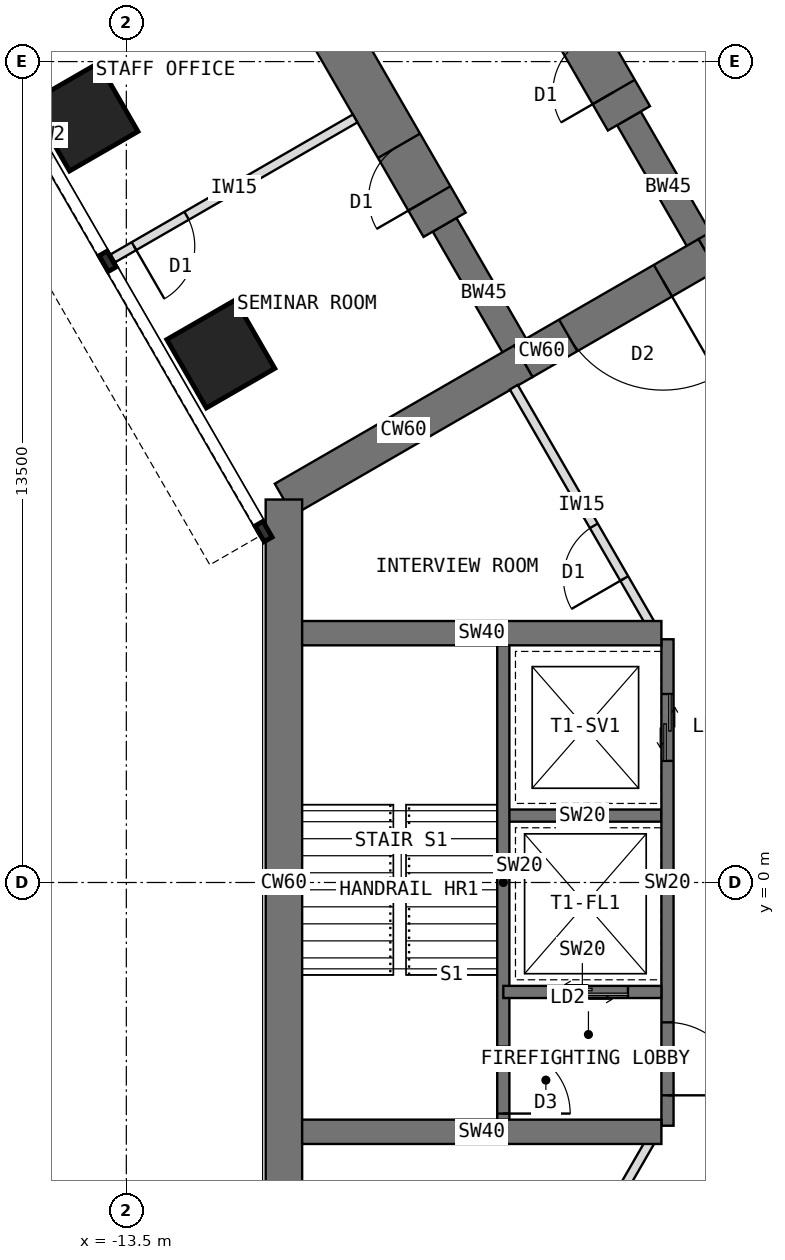
"""IFC4 building model, lengths in metres.
Left out: names, types, materials, properties, quantities, classifications, styles, units other than length and angle.
Written with IfcOpenShell. Run it as: python <this file> out.ifc"""

import sys

from ifc_helpers import new_model, si_unit, direction, frame, frame_2d, origin, origin_2d, place, context, subcontext, project, spatial, rectangle, extrude, element, fill, save


model = new_model("IFC4")
c1 = context("Model", 3, precision=1e-05, world=origin(), true_north=direction((0.0, 1.0)))
c2 = subcontext(c1, "Body", "Model", "MODEL_VIEW")
j1 = project(units=[si_unit("LENGTHUNIT", "METRE"), si_unit("PLANEANGLEUNIT", "RADIAN")], contexts=[c1])
p1 = place(None, origin())
s1 = spatial("IfcSite", under=j1, at=p1, CompositionType="ELEMENT")
p2 = place(p1, origin())
s2 = spatial("IfcBuilding", under=s1, at=p2, CompositionType="ELEMENT")
p3 = place(p2, frame((0.0, 0.0, 133.5)))
s3 = spatial("IfcBuildingStorey", under=s2, at=p3, CompositionType="ELEMENT", Elevation=133.5)
p4 = place(p3, frame((0.0, 12.596, 0.0), z_axis=(0.0, 0.0, 1.0), x_axis=(-0.866011268655, -0.500024481964, 0.0)))
e1 = element("IfcWall", 1, at=p4, inside=s3, PredefinedType="SHEAR", context=c2, shape_type="SweptSolid", body=[
    extrude(rectangle(XDim=4.548, YDim=0.6, at=frame_2d((2.274, 0.0))), origin(), (0.0, 0.0, 1.0), 4.0),
])
p5 = place(p3, frame((-3.939, 10.322, 0.0), z_axis=(0.0, 0.0, 1.0), x_axis=(-0.866019471182, -0.500010275428, 0.0)))
e2 = element("IfcWall", 2, at=p5, inside=s3, PredefinedType="SHEAR", context=c2, shape_type="SweptSolid", body=[
    extrude(rectangle(XDim=3.5, YDim=0.6, at=frame_2d((1.75, 0.0))), origin(), (0.0, 0.0, 1.0), 4.0),
])
p6 = place(p5, frame((0.85, 0.0, 0.0)))
e3 = element("IfcOpeningElement", 3, at=p6, cuts=e2, PredefinedType="OPENING", context=c2, shape_type="SweptSolid", body=[
    extrude(rectangle(XDim=1.8, YDim=2.1, at=frame_2d((0.9, 1.05))), frame((0.0, 0.31, 0.0), z_axis=(0.0, -1.0, 0.0), x_axis=(1.0, 0.0, 0.0)), (0.0, 0.0, 1.0), 0.62),
])
p7 = place(p3, frame((-6.97, 8.572, 0.0), z_axis=(0.0, 0.0, 1.0), x_axis=(-0.866034513004, -0.499984222037, 0.0)))
e4 = element("IfcWall", 4, at=p7, inside=s3, PredefinedType="SHEAR", context=c2, shape_type="SweptSolid", body=[
    extrude(rectangle(XDim=4.548, YDim=0.6, at=frame_2d((2.274, 0.0))), origin(), (0.0, 0.0, 1.0), 4.0),
])
p8 = place(p3, frame((-10.908, 6.298, 0.0), z_axis=(0.0, 0.0, 1.0), x_axis=(0.0, -1.0, 0.0)))
e5 = element("IfcWall", 5, at=p8, inside=s3, PredefinedType="SHEAR", context=c2, shape_type="SweptSolid", body=[
    extrude(rectangle(XDim=12.596, YDim=0.6, at=frame_2d((6.298, 0.0))), origin(), (0.0, 0.0, 1.0), 4.0),
])
p9 = place(p3, frame((-6.97, 8.572, 0.0), z_axis=(0.0, 0.0, 1.0), x_axis=(-0.499988811324, 0.866031863473, 0.0)))
e6 = element("IfcWall", 6, at=p9, inside=s3, PredefinedType="SHEAR", context=c2, shape_type="SweptSolid", body=[
    extrude(rectangle(XDim=2.592, YDim=0.45, at=frame_2d((1.296, 0.0))), origin(), (0.0, 0.0, 1.0), 4.0),
])
p10 = place(p3, frame((-8.266, 10.816, 0.0), z_axis=(0.0, 0.0, 1.0), x_axis=(-0.499996231654, 0.866027579429, 0.0)))
e7 = element("IfcWall", 7, at=p10, inside=s3, PredefinedType="SHEAR", context=c2, shape_type="SweptSolid", body=[
    extrude(rectangle(XDim=13.2, YDim=0.8, at=frame_2d((6.6, 0.0))), origin(), (0.0, 0.0, 1.0), 4.0),
])
p11 = place(p10, frame((0.5, 0.0, 0.0)))
e8 = element("IfcOpeningElement", 8, at=p11, cuts=e7, PredefinedType="OPENING", context=c2, shape_type="SweptSolid", body=[
    extrude(rectangle(XDim=1.0, YDim=2.1, at=frame_2d((0.5, 1.05))), frame((0.0, 0.41, 0.0), z_axis=(0.0, -1.0, 0.0), x_axis=(1.0, 0.0, 0.0)), (0.0, 0.0, 1.0), 0.82),
])
p12 = place(p10, frame((7.25, 0.0, 0.0)))
e9 = element("IfcOpeningElement", 9, at=p12, cuts=e7, PredefinedType="OPENING", context=c2, shape_type="SweptSolid", body=[
    extrude(rectangle(XDim=1.0, YDim=2.1, at=frame_2d((0.5, 1.05))), frame((0.0, 0.41, 0.0), z_axis=(0.0, -1.0, 0.0), x_axis=(1.0, 0.0, 0.0)), (0.0, 0.0, 1.0), 0.82),
])
p13 = place(p3, frame((-3.939, 10.322, 0.0), z_axis=(0.0, 0.0, 1.0), x_axis=(-0.499918158782, 0.866072649678, 0.0)))
e10 = element("IfcWall", 10, at=p13, inside=s3, PredefinedType="SHEAR", context=c2, shape_type="SweptSolid", body=[
    extrude(rectangle(XDim=2.592, YDim=0.45, at=frame_2d((1.296, 0.0))), origin(), (0.0, 0.0, 1.0), 4.0),
])
p14 = place(p3, frame((-5.234, 12.566, 0.0), z_axis=(0.0, 0.0, 1.0), x_axis=(-0.500010103361, 0.866019570528, 0.0)))
e11 = element("IfcWall", 11, at=p14, inside=s3, PredefinedType="SHEAR", context=c2, shape_type="SweptSolid", body=[
    extrude(rectangle(XDim=13.2, YDim=0.8, at=frame_2d((6.6, 0.0))), origin(), (0.0, 0.0, 1.0), 4.0),
])
p15 = place(p14, frame((0.5, 0.0, 0.0)))
e12 = element("IfcOpeningElement", 12, at=p15, cuts=e11, PredefinedType="OPENING", context=c2, shape_type="SweptSolid", body=[
    extrude(rectangle(XDim=1.0, YDim=2.1, at=frame_2d((0.5, 1.05))), frame((0.0, 0.41, 0.0), z_axis=(0.0, -1.0, 0.0), x_axis=(1.0, 0.0, 0.0)), (0.0, 0.0, 1.0), 0.82),
])
p16 = place(p14, frame((7.25, 0.0, 0.0)))
e13 = element("IfcOpeningElement", 13, at=p16, cuts=e11, PredefinedType="OPENING", context=c2, shape_type="SweptSolid", body=[
    extrude(rectangle(XDim=1.0, YDim=2.1, at=frame_2d((0.5, 1.05))), frame((0.0, 0.41, 0.0), z_axis=(0.0, -1.0, 0.0), x_axis=(1.0, 0.0, 0.0)), (0.0, 0.0, 1.0), 0.82),
])
for number, where, z_axis, x_axis in (
    (14, (-11.946, 8.691, 0.0), (0.0, 0.0, 1.0), (0.866, 0.5, 0.0)),
    (15, (-14.196, 12.588, 0.0), (0.0, 0.0, 1.0), (0.866, 0.5, 0.0)),
):
    element("IfcColumn", number, at=place(p3, frame(where, z_axis=z_axis, x_axis=x_axis)), inside=s3, PredefinedType="COLUMN", context=c2, shape_type="SweptSolid", body=[
        extrude(rectangle(XDim=1.3, YDim=1.3, at=origin_2d()), origin(), (0.0, 0.0, 1.0), 4.0),
    ])
p17 = place(p3, frame((-4.6, 4.0, 0.0), z_axis=(0.0, 0.0, 1.0), x_axis=(0.0, -1.0, 0.0)))
e16 = element("IfcWall", 16, at=p17, inside=s3, PredefinedType="SHEAR", context=c2, shape_type="SweptSolid", body=[
    extrude(rectangle(XDim=8.0, YDim=0.2, at=frame_2d((4.0, 0.0))), origin(), (0.0, 0.0, 1.0), 4.0),
])
p18 = place(p17, frame((6.3, 0.0, 0.0)))
e17 = element("IfcOpeningElement", 17, at=p18, cuts=e16, PredefinedType="OPENING", context=c2, shape_type="SweptSolid", body=[
    extrude(rectangle(XDim=1.2, YDim=2.1, at=frame_2d((0.6, 1.05))), frame((0.0, 0.11, 0.0), z_axis=(0.0, -1.0, 0.0), x_axis=(1.0, 0.0, 0.0)), (0.0, 0.0, 1.0), 0.22),
])
p19 = place(p17, frame((0.9, 0.0, 0.0)))
e18 = element("IfcOpeningElement", 18, at=p19, cuts=e16, PredefinedType="OPENING", context=c2, shape_type="SweptSolid", body=[
    extrude(rectangle(XDim=1.1, YDim=2.2, at=frame_2d((0.55, 1.1))), frame((0.0, 0.11, 0.0), z_axis=(0.0, -1.0, 0.0), x_axis=(1.0, 0.0, 0.0)), (0.0, 0.0, 1.0), 0.22),
])
p20 = place(p3, frame((-4.7, 1.1, 0.0), z_axis=(0.0, 0.0, 1.0), x_axis=(-1.0, 0.0, 0.0)))
e19 = element("IfcWall", 19, at=p20, inside=s3, PredefinedType="SHEAR", context=c2, shape_type="SweptSolid", body=[
    extrude(rectangle(XDim=2.6, YDim=0.2, at=frame_2d((1.3, 0.0))), origin(), (0.0, 0.0, 1.0), 4.0),
])
p21 = place(p3, frame((-4.7, -1.8, 0.0), z_axis=(0.0, 0.0, 1.0), x_axis=(-1.0, 0.0, 0.0)))
e20 = element("IfcWall", 20, at=p21, inside=s3, PredefinedType="SHEAR", context=c2, shape_type="SweptSolid", body=[
    extrude(rectangle(XDim=2.6, YDim=0.2, at=frame_2d((1.3, 0.0))), origin(), (0.0, 0.0, 1.0), 4.0),
])
p22 = place(p21, frame((0.55, 0.0, 0.0)))
e21 = element("IfcOpeningElement", 21, at=p22, cuts=e20, PredefinedType="OPENING", context=c2, shape_type="SweptSolid", body=[
    extrude(rectangle(XDim=1.3, YDim=2.2, at=frame_2d((0.65, 1.1))), frame((0.0, 0.11, 0.0), z_axis=(0.0, -1.0, 0.0), x_axis=(1.0, 0.0, 0.0)), (0.0, 0.0, 1.0), 0.22),
])
p23 = place(p3, frame((-7.3, 4.0, 0.0), z_axis=(0.0, 0.0, 1.0), x_axis=(0.0, -1.0, 0.0)))
e22 = element("IfcWall", 22, at=p23, inside=s3, PredefinedType="SHEAR", context=c2, shape_type="SweptSolid", body=[
    extrude(rectangle(XDim=8.0, YDim=0.2, at=frame_2d((4.0, 0.0))), origin(), (0.0, 0.0, 1.0), 4.0),
])
p24 = place(p23, frame((6.7, 0.0, 0.0)))
e23 = element("IfcOpeningElement", 23, at=p24, cuts=e22, PredefinedType="OPENING", context=c2, shape_type="SweptSolid", body=[
    extrude(rectangle(XDim=1.1, YDim=2.1, at=frame_2d((0.55, 1.05))), frame((0.0, 0.11, 0.0), z_axis=(0.0, -1.0, 0.0), x_axis=(1.0, 0.0, 0.0)), (0.0, 0.0, 1.0), 0.22),
])
for number, where, z_axis, x_axis in (
    (24, (-4.7, -4.1, 0.0), (0.0, 0.0, 1.0), (-1.0, 0.0, 0.0)),
    (25, (-4.7, 4.1, 0.0), (0.0, 0.0, 1.0), (-1.0, 0.0, 0.0)),
):
    element("IfcWall", number, at=place(p3, frame(where, z_axis=z_axis, x_axis=x_axis)), inside=s3, PredefinedType="SHEAR", context=c2, shape_type="SweptSolid", body=[
        extrude(rectangle(XDim=5.908, YDim=0.4, at=frame_2d((2.954, 0.0))), origin(), (0.0, 0.0, 1.0), 4.0),
    ])
p25 = place(p3, frame((-9.737, 12.565, 0.0), z_axis=(0.0, 0.0, 1.0), x_axis=(-0.866016770315, -0.500014953309, 0.0)))
e26 = element("IfcWall", 26, at=p25, inside=s3, PredefinedType="PARTITIONING", context=c2, shape_type="SweptSolid", body=[
    extrude(rectangle(XDim=4.6, YDim=0.15, at=frame_2d((2.3, 0.0))), origin(), (0.0, 0.0, 1.0), 3.8),
])
p26 = place(p25, frame((3.2, 0.0, 0.0)))
e27 = element("IfcOpeningElement", 27, at=p26, cuts=e26, PredefinedType="OPENING", context=c2, shape_type="SweptSolid", body=[
    extrude(rectangle(XDim=1.0, YDim=2.1, at=frame_2d((0.5, 1.05))), frame((0.0, 0.085, 0.0), z_axis=(0.0, -1.0, 0.0), x_axis=(1.0, 0.0, 0.0)), (0.0, 0.0, 1.0), 0.17),
])
p27 = place(p3, frame((-7.128, -8.146, 0.0), z_axis=(0.0, 0.0, 1.0), x_axis=(0.499999473313, 0.866025707867, 0.0)))
e28 = element("IfcWall", 28, at=p27, inside=s3, PredefinedType="PARTITIONING", context=c2, shape_type="SweptSolid", body=[
    extrude(rectangle(XDim=4.476, YDim=0.15, at=frame_2d((2.238, 0.0))), origin(), (0.0, 0.0, 1.0), 3.8),
])
p28 = place(p27, frame((0.843, 0.0, 0.0)))
e29 = element("IfcOpeningElement", 29, at=p28, cuts=e28, PredefinedType="OPENING", context=c2, shape_type="SweptSolid", body=[
    extrude(rectangle(XDim=1.0, YDim=2.1, at=frame_2d((0.5, 1.05))), frame((0.0, 0.085, 0.0), z_axis=(0.0, -1.0, 0.0), x_axis=(1.0, 0.0, 0.0)), (0.0, 0.0, 1.0), 0.17),
])
p29 = place(p3, frame((-4.89, 4.27, 0.0), z_axis=(0.0, 0.0, 1.0), x_axis=(-0.499999473313, 0.866025707867, 0.0)))
e30 = element("IfcWall", 30, at=p29, inside=s3, PredefinedType="PARTITIONING", context=c2, shape_type="SweptSolid", body=[
    extrude(rectangle(XDim=4.476, YDim=0.15, at=frame_2d((2.238, 0.0))), origin(), (0.0, 0.0, 1.0), 3.8),
])
p30 = place(p29, frame((0.843, 0.0, 0.0)))
e31 = element("IfcOpeningElement", 31, at=p30, cuts=e30, PredefinedType="OPENING", context=c2, shape_type="SweptSolid", body=[
    extrude(rectangle(XDim=1.0, YDim=2.1, at=frame_2d((0.5, 1.05))), frame((0.0, 0.085, 0.0), z_axis=(0.0, -1.0, 0.0), x_axis=(1.0, 0.0, 0.0)), (0.0, 0.0, 1.0), 0.17),
])
p31 = place(p18, origin())
e32 = element("IfcDoor", 32, at=p31, inside=s3, OperationType="SINGLE_SWING_RIGHT", PredefinedType="DOOR", context=c2, shape_type="SweptSolid", body=[
    extrude(rectangle(XDim=1.2, YDim=2.1, at=frame_2d((0.6, 1.05))), frame((0.0, 0.025, 0.0), z_axis=(0.0, -1.0, 0.0), x_axis=(1.0, 0.0, 0.0)), (0.0, 0.0, 1.0), 0.05),
])
fill(e17, e32)
p32 = place(p22, origin())
e33 = element("IfcDoor", 33, at=p32, inside=s3, OperationType="DOUBLE_DOOR_SLIDING", PredefinedType="DOOR", context=c2, shape_type="SweptSolid", body=[
    extrude(rectangle(XDim=1.3, YDim=2.2, at=frame_2d((0.65, 1.1))), frame((0.0, 0.025, 0.0), z_axis=(0.0, -1.0, 0.0), x_axis=(1.0, 0.0, 0.0)), (0.0, 0.0, 1.0), 0.05),
])
fill(e21, e33)
p33 = place(p19, origin())
e34 = element("IfcDoor", 34, at=p33, inside=s3, OperationType="DOUBLE_DOOR_SLIDING", PredefinedType="DOOR", context=c2, shape_type="SweptSolid", body=[
    extrude(rectangle(XDim=1.1, YDim=2.2, at=frame_2d((0.55, 1.1))), frame((0.0, 0.025, 0.0), z_axis=(0.0, -1.0, 0.0), x_axis=(1.0, 0.0, 0.0)), (0.0, 0.0, 1.0), 0.05),
])
fill(e18, e34)
p34 = place(p24, origin())
e35 = element("IfcDoor", 35, at=p34, inside=s3, OperationType="SINGLE_SWING_RIGHT", PredefinedType="DOOR", context=c2, shape_type="SweptSolid", body=[
    extrude(rectangle(XDim=1.1, YDim=2.1, at=frame_2d((0.55, 1.05))), frame((0.0, 0.025, 0.0), z_axis=(0.0, -1.0, 0.0), x_axis=(1.0, 0.0, 0.0)), (0.0, 0.0, 1.0), 0.05),
])
fill(e23, e35)
p35 = place(p6, origin())
e36 = element("IfcDoor", 36, at=p35, inside=s3, OperationType="DOUBLE_DOOR_DOUBLE_SWING", PredefinedType="DOOR", context=c2, shape_type="SweptSolid", body=[
    extrude(rectangle(XDim=1.72, YDim=2.06, at=frame_2d((0.9, 1.03))), frame((0.0, 0.025, 0.0), z_axis=(0.0, -1.0, 0.0), x_axis=(1.0, 0.0, 0.0)), (0.0, 0.0, 1.0), 0.05),
    extrude(rectangle(XDim=0.04, YDim=2.1, at=frame_2d((0.02, 1.05))), frame((0.0, 0.3, 0.0), z_axis=(0.0, -1.0, 0.0), x_axis=(1.0, 0.0, 0.0)), (0.0, 0.0, 1.0), 0.6),
    extrude(rectangle(XDim=0.04, YDim=2.1, at=frame_2d((1.78, 1.05))), frame((0.0, 0.3, 0.0), z_axis=(0.0, -1.0, 0.0), x_axis=(1.0, 0.0, 0.0)), (0.0, 0.0, 1.0), 0.6),
    extrude(rectangle(XDim=1.72, YDim=0.04, at=frame_2d((0.9, 2.08))), frame((0.0, 0.3, 0.0), z_axis=(0.0, -1.0, 0.0), x_axis=(1.0, 0.0, 0.0)), (0.0, 0.0, 1.0), 0.6),
])
fill(e3, e36)
p36 = place(p26, origin())
e37 = element("IfcDoor", 37, at=p36, inside=s3, OperationType="SINGLE_SWING_RIGHT", PredefinedType="DOOR", context=c2, shape_type="SweptSolid", body=[
    extrude(rectangle(XDim=1.0, YDim=2.1, at=frame_2d((0.5, 1.05))), frame((0.0, 0.025, 0.0), z_axis=(0.0, -1.0, 0.0), x_axis=(1.0, 0.0, 0.0)), (0.0, 0.0, 1.0), 0.05),
])
fill(e27, e37)
p37 = place(p30, origin())
e38 = element("IfcDoor", 38, at=p37, inside=s3, OperationType="SINGLE_SWING_LEFT", PredefinedType="DOOR", context=c2, shape_type="SweptSolid", body=[
    extrude(rectangle(XDim=1.0, YDim=2.1, at=frame_2d((0.5, 1.05))), frame((0.0, 0.025, 0.0), z_axis=(0.0, -1.0, 0.0), x_axis=(1.0, 0.0, 0.0)), (0.0, 0.0, 1.0), 0.05),
])
fill(e31, e38)
p38 = place(p11, origin())
e39 = element("IfcDoor", 39, at=p38, inside=s3, OperationType="SINGLE_SWING_LEFT", PredefinedType="DOOR", context=c2, shape_type="SweptSolid", body=[
    extrude(rectangle(XDim=0.92, YDim=2.06, at=frame_2d((0.5, 1.03))), frame((0.0, 0.025, 0.0), z_axis=(0.0, -1.0, 0.0), x_axis=(1.0, 0.0, 0.0)), (0.0, 0.0, 1.0), 0.05),
    extrude(rectangle(XDim=0.04, YDim=2.1, at=frame_2d((0.02, 1.05))), frame((0.0, 0.4, 0.0), z_axis=(0.0, -1.0, 0.0), x_axis=(1.0, 0.0, 0.0)), (0.0, 0.0, 1.0), 0.8),
    extrude(rectangle(XDim=0.04, YDim=2.1, at=frame_2d((0.98, 1.05))), frame((0.0, 0.4, 0.0), z_axis=(0.0, -1.0, 0.0), x_axis=(1.0, 0.0, 0.0)), (0.0, 0.0, 1.0), 0.8),
    extrude(rectangle(XDim=0.92, YDim=0.04, at=frame_2d((0.5, 2.08))), frame((0.0, 0.4, 0.0), z_axis=(0.0, -1.0, 0.0), x_axis=(1.0, 0.0, 0.0)), (0.0, 0.0, 1.0), 0.8),
])
fill(e8, e39)
p39 = place(p15, origin())
e40 = element("IfcDoor", 40, at=p39, inside=s3, OperationType="SINGLE_SWING_LEFT", PredefinedType="DOOR", context=c2, shape_type="SweptSolid", body=[
    extrude(rectangle(XDim=0.92, YDim=2.06, at=frame_2d((0.5, 1.03))), frame((0.0, 0.025, 0.0), z_axis=(0.0, -1.0, 0.0), x_axis=(1.0, 0.0, 0.0)), (0.0, 0.0, 1.0), 0.05),
    extrude(rectangle(XDim=0.04, YDim=2.1, at=frame_2d((0.02, 1.05))), frame((0.0, 0.4, 0.0), z_axis=(0.0, -1.0, 0.0), x_axis=(1.0, 0.0, 0.0)), (0.0, 0.0, 1.0), 0.8),
    extrude(rectangle(XDim=0.04, YDim=2.1, at=frame_2d((0.98, 1.05))), frame((0.0, 0.4, 0.0), z_axis=(0.0, -1.0, 0.0), x_axis=(1.0, 0.0, 0.0)), (0.0, 0.0, 1.0), 0.8),
    extrude(rectangle(XDim=0.92, YDim=0.04, at=frame_2d((0.5, 2.08))), frame((0.0, 0.4, 0.0), z_axis=(0.0, -1.0, 0.0), x_axis=(1.0, 0.0, 0.0)), (0.0, 0.0, 1.0), 0.8),
])
fill(e12, e40)
save(model, sys.argv[1])
